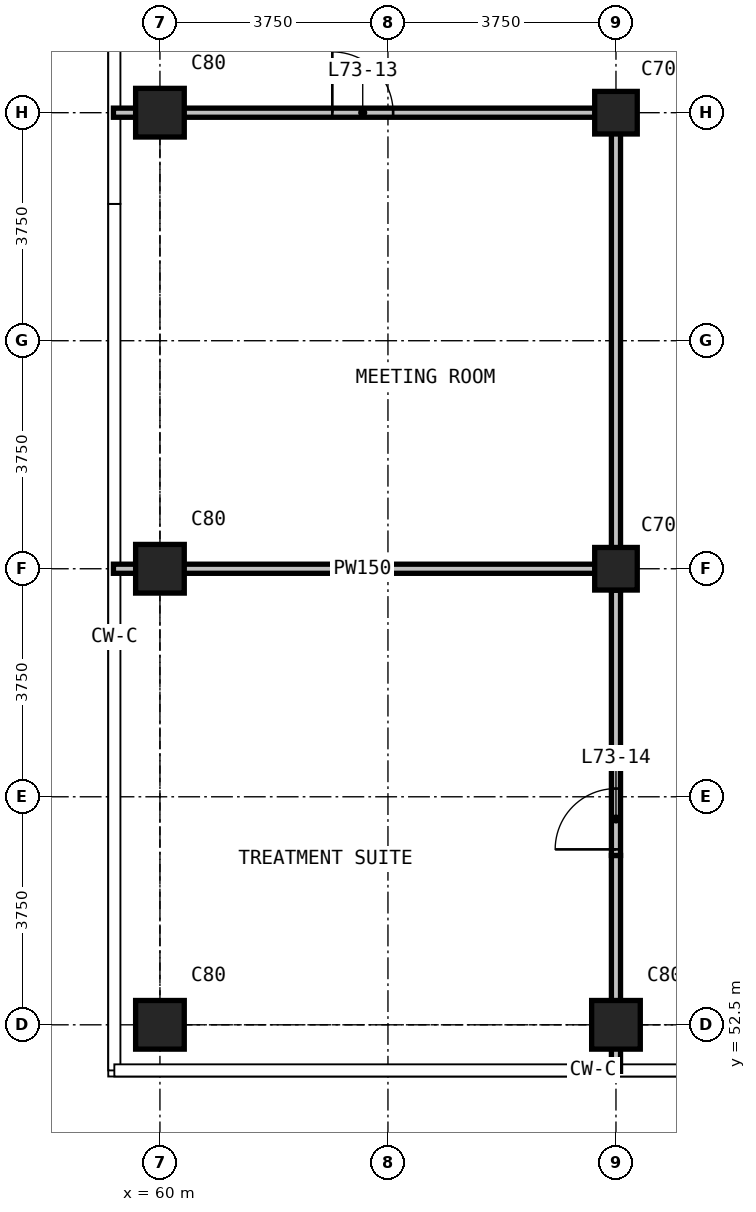
"""IFC4 building model, lengths in metres.
Left out: names, types, materials, properties, quantities, classifications, styles, units other than length and angle.
Written with IfcOpenShell. Run it as: python <this file> out.ifc"""

import sys

from ifc_helpers import new_model, si_unit, direction, frame, frame_2d, origin, origin_2d, place, context, subcontext, project, spatial, rectangle, extrude, element, fill, save


model = new_model("IFC4")
c1 = context("Model", 3, precision=1e-05, world=origin(), true_north=direction((0.0, 1.0)))
c2 = subcontext(c1, "Body", "Model", "MODEL_VIEW")
j1 = project(units=[si_unit("LENGTHUNIT", "METRE"), si_unit("PLANEANGLEUNIT", "RADIAN")], contexts=[c1])
p1 = place(None, origin())
s1 = spatial("IfcSite", under=j1, at=p1, CompositionType="ELEMENT")
p2 = place(p1, origin())
s2 = spatial("IfcBuilding", under=s1, at=p2, CompositionType="ELEMENT")
p3 = place(p2, frame((0.0, 0.0, 280.1)))
s3 = spatial("IfcBuildingStorey", under=s2, at=p3, CompositionType="ELEMENT", Elevation=280.1)
for number, where, z_axis, x_axis in (
    (1, (60.0, 52.5, 0.0), (0.0, 0.0, 1.0), (1.0, 0.0, 0.0)),
    (2, (60.0, 60.0, 0.0), (0.0, 0.0, 1.0), (1.0, 0.0, 0.0)),
    (3, (60.0, 67.5, 0.0), (0.0, 0.0, 1.0), (1.0, 0.0, 0.0)),
    (4, (67.5, 52.5, 0.0), (0.0, 0.0, 1.0), (1.0, 0.0, 0.0)),
):
    element("IfcColumn", number, at=place(p3, frame(where, z_axis=z_axis, x_axis=x_axis)), inside=s3, PredefinedType="COLUMN", context=c2, shape_type="SweptSolid", body=[
        extrude(rectangle(XDim=0.8, YDim=0.8, at=origin_2d()), origin(), (0.0, 0.0, 1.0), 3.6),
    ])
for number, where, z_axis, x_axis in (
    (5, (67.5, 60.0, 0.0), (0.0, 0.0, 1.0), (1.0, 0.0, 0.0)),
    (6, (67.5, 67.5, 0.0), (0.0, 0.0, 1.0), (1.0, 0.0, 0.0)),
):
    element("IfcColumn", number, at=place(p3, frame(where, z_axis=z_axis, x_axis=x_axis)), inside=s3, PredefinedType="COLUMN", context=c2, shape_type="SweptSolid", body=[
        extrude(rectangle(XDim=0.7, YDim=0.7, at=origin_2d()), origin(), (0.0, 0.0, 1.0), 3.6),
    ])
p4 = place(p3, frame((59.235, 60.0, 0.0), z_axis=(0.0, 0.0, 1.0), x_axis=(1.0, 0.0, 0.0)))
e7 = element("IfcWall", 7, at=p4, inside=s3, PredefinedType="PARTITIONING", context=c2, shape_type="SweptSolid", body=[
    extrude(rectangle(XDim=8.19, YDim=0.15, at=frame_2d((4.095, 0.0))), origin(), (0.0, 0.0, 1.0), 3.3),
])
p5 = place(p3, frame((59.235, 67.5, 0.0), z_axis=(0.0, 0.0, 1.0), x_axis=(1.0, 0.0, 0.0)))
e8 = element("IfcWall", 8, at=p5, inside=s3, PredefinedType="PARTITIONING", context=c2, shape_type="SweptSolid", body=[
    extrude(rectangle(XDim=8.19, YDim=0.15, at=frame_2d((4.095, 0.0))), origin(), (0.0, 0.0, 1.0), 3.3),
])
p6 = place(p5, frame((3.6, 0.0, 0.0)))
e9 = element("IfcOpeningElement", 9, at=p6, cuts=e8, PredefinedType="OPENING", context=c2, shape_type="SweptSolid", body=[
    extrude(rectangle(XDim=1.0, YDim=2.2, at=frame_2d((0.5, 1.1))), frame((0.0, 0.085, 0.0), z_axis=(0.0, -1.0, 0.0), x_axis=(1.0, 0.0, 0.0)), (0.0, 0.0, 1.0), 0.17),
])
p7 = place(p3, frame((67.5, 51.735, 0.0), z_axis=(0.0, 0.0, 1.0), x_axis=(0.0, 1.0, 0.0)))
e10 = element("IfcWall", 10, at=p7, inside=s3, PredefinedType="PARTITIONING", context=c2, shape_type="SweptSolid", body=[
    extrude(rectangle(XDim=3.55, YDim=0.15, at=frame_2d((1.775, 0.0))), origin(), (0.0, 0.0, 1.0), 3.3),
])
p8 = place(p3, frame((67.5, 55.285, 0.0), z_axis=(0.0, 0.0, 1.0), x_axis=(0.0, 1.0, 0.0)))
e11 = element("IfcWall", 11, at=p8, inside=s3, PredefinedType="PARTITIONING", context=c2, shape_type="SweptSolid", body=[
    extrude(rectangle(XDim=4.365, YDim=0.15, at=frame_2d((2.183, 0.0))), origin(), (0.0, 0.0, 1.0), 2.5),
])
p9 = place(p8, frame((0.1, 0.0, 0.0)))
e12 = element("IfcOpeningElement", 12, at=p9, cuts=e11, PredefinedType="OPENING", context=c2, shape_type="SweptSolid", body=[
    extrude(rectangle(XDim=1.0, YDim=2.2, at=frame_2d((0.5, 1.1))), frame((0.0, 0.085, 0.0), z_axis=(0.0, -1.0, 0.0), x_axis=(1.0, 0.0, 0.0)), (0.0, 0.0, 1.0), 0.17),
])
p10 = place(p3, frame((67.5, 59.65, 0.0), z_axis=(0.0, 0.0, 1.0), x_axis=(0.0, 1.0, 0.0)))
e13 = element("IfcWall", 13, at=p10, inside=s3, PredefinedType="PARTITIONING", context=c2, shape_type="SweptSolid", body=[
    extrude(rectangle(XDim=7.925, YDim=0.15, at=frame_2d((3.962, 0.0))), origin(), (0.0, 0.0, 1.0), 3.3),
])
p11 = place(p6, origin())
e14 = element("IfcDoor", 14, at=p11, inside=s3, OperationType="SINGLE_SWING_LEFT", PredefinedType="DOOR", context=c2, shape_type="SweptSolid", body=[
    extrude(rectangle(XDim=1.0, YDim=2.2, at=frame_2d((0.5, 1.1))), frame((0.0, 0.025, 0.0), z_axis=(0.0, -1.0, 0.0), x_axis=(1.0, 0.0, 0.0)), (0.0, 0.0, 1.0), 0.05),
])
fill(e9, e14)
p12 = place(p9, origin())
e15 = element("IfcDoor", 15, at=p12, inside=s3, OperationType="SINGLE_SWING_LEFT", PredefinedType="DOOR", context=c2, shape_type="SweptSolid", body=[
    extrude(rectangle(XDim=1.0, YDim=2.2, at=frame_2d((0.5, 1.1))), frame((0.0, 0.025, 0.0), z_axis=(0.0, -1.0, 0.0), x_axis=(1.0, 0.0, 0.0)), (0.0, 0.0, 1.0), 0.05),
])
fill(e12, e15)
save(model, sys.argv[1])
